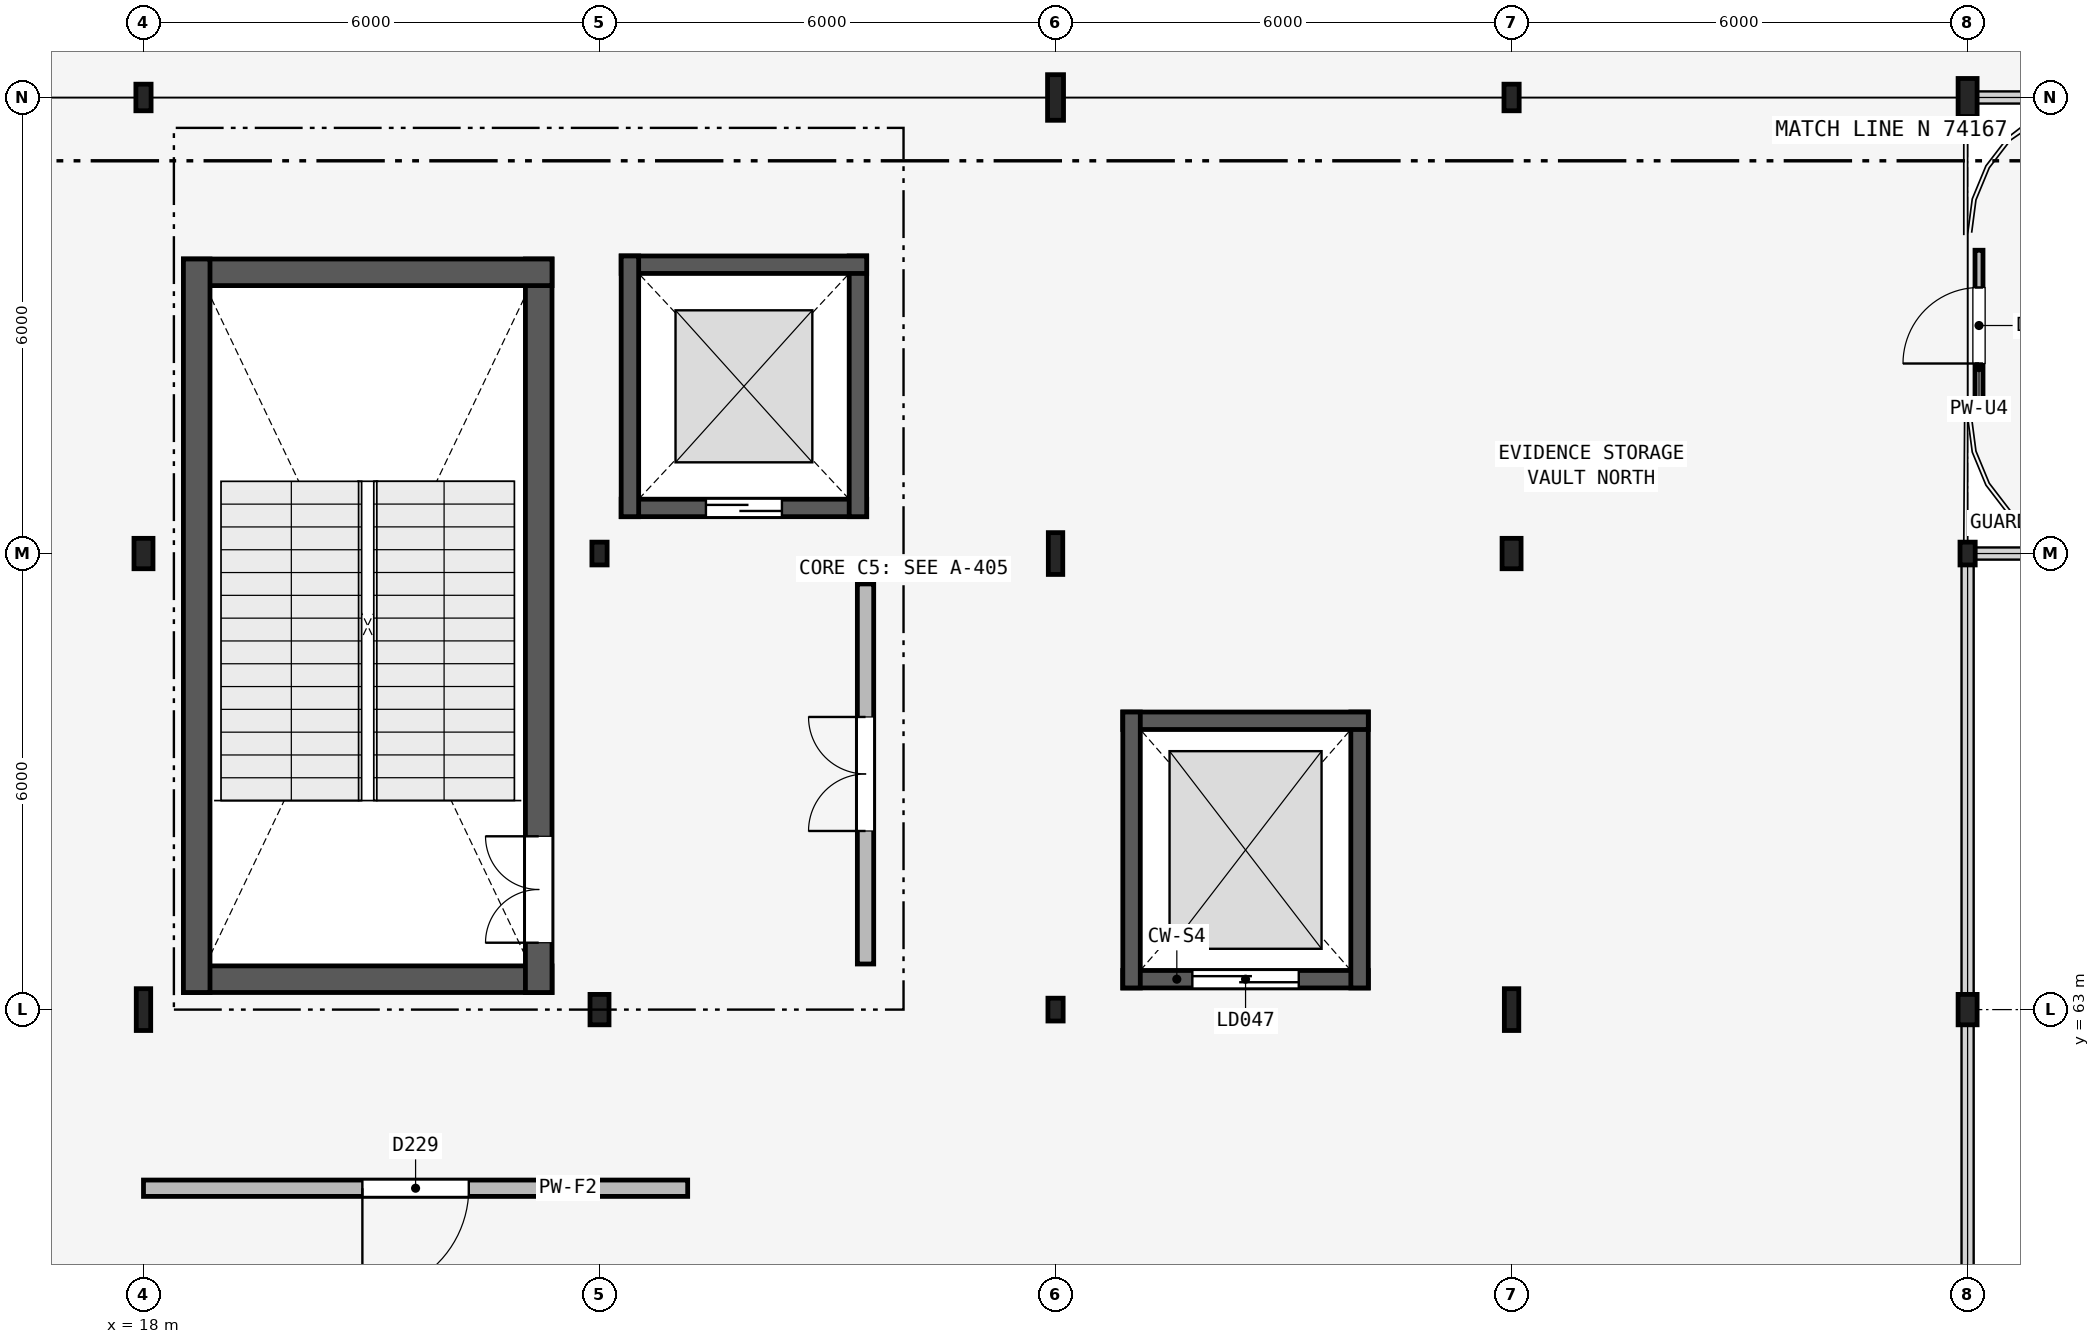
"""IFC4 building model, lengths in metres.
Left out: names, types, materials, properties, quantities, classifications, styles, units other than length and angle.
Written with IfcOpenShell. Run it as: python <this file> out.ifc"""

import sys

from ifc_helpers import new_model, si_unit, direction, frame, frame_2d, origin, origin_2d, place, context, subcontext, project, spatial, rectangle, hollow_rectangle, i_section, extrude, element, fill, save


model = new_model("IFC4")
c1 = context("Model", 3, precision=1e-05, world=origin(), true_north=direction((0.0, 1.0)))
c2 = subcontext(c1, "Body", "Model", "MODEL_VIEW")
j1 = project(units=[si_unit("LENGTHUNIT", "METRE"), si_unit("PLANEANGLEUNIT", "RADIAN")], contexts=[c1])
p1 = place(None, origin())
s1 = spatial("IfcSite", under=j1, at=p1, CompositionType="ELEMENT")
p2 = place(p1, origin())
s2 = spatial("IfcBuilding", under=s1, at=p2, CompositionType="ELEMENT")
p3 = place(p2, frame((0.0, 0.0, 9.3)))
s3 = spatial("IfcBuildingStorey", under=s2, at=p3, CompositionType="ELEMENT", Elevation=9.3)
p4 = place(p3, frame((18.0, 63.0, 0.0), z_axis=(0.0, 0.0, 1.0), x_axis=(1.0, 0.0, 0.0)))
e1 = element("IfcColumn", 1, at=p4, inside=s3, PredefinedType="COLUMN", context=c2, shape_type="SweptSolid", body=[
    extrude(i_section(OverallWidth=0.19, OverallDepth=0.55, WebThickness=0.011, FlangeThickness=0.019, FilletRadius=0.018, at=origin_2d()), origin(), (0.0, 0.0, 1.0), 4.2),
])
p5 = place(p3, frame((18.0, 69.0, 0.0), z_axis=(0.0, 0.0, 1.0), x_axis=(1.0, 0.0, 0.0)))
e2 = element("IfcColumn", 2, at=p5, inside=s3, PredefinedType="COLUMN", context=c2, shape_type="SweptSolid", body=[
    extrude(i_section(OverallWidth=0.25, OverallDepth=0.4, WebThickness=0.01, FlangeThickness=0.013, FilletRadius=0.014, at=origin_2d()), origin(), (0.0, 0.0, 1.0), 4.2),
])
p6 = place(p3, frame((18.0, 75.0, 0.0), z_axis=(0.0, 0.0, 1.0), x_axis=(1.0, 0.0, 0.0)))
e3 = element("IfcColumn", 3, at=p6, inside=s3, PredefinedType="COLUMN", context=c2, shape_type="SweptSolid", body=[
    extrude(hollow_rectangle(XDim=0.2, YDim=0.35, WallThickness=0.012, InnerFilletRadius=0.012, OuterFilletRadius=0.024, at=origin_2d()), origin(), (0.0, 0.0, 1.0), 4.2),
])
p7 = place(p3, frame((24.0, 63.0, 0.0), z_axis=(0.0, 0.0, 1.0), x_axis=(1.0, 0.0, 0.0)))
e4 = element("IfcColumn", 4, at=p7, inside=s3, PredefinedType="COLUMN", context=c2, shape_type="SweptSolid", body=[
    extrude(i_section(OverallWidth=0.25, OverallDepth=0.4, WebThickness=0.01, FlangeThickness=0.013, FilletRadius=0.014, at=origin_2d()), origin(), (0.0, 0.0, 1.0), 4.2),
])
for number, where, z_axis, x_axis in (
    (5, (24.0, 69.0, 0.0), (0.0, 0.0, 1.0), (1.0, 0.0, 0.0)),
    (6, (30.0, 63.0, 0.0), (0.0, 0.0, 1.0), (1.0, 0.0, 0.0)),
):
    element("IfcColumn", number, at=place(p3, frame(where, z_axis=z_axis, x_axis=x_axis)), inside=s3, PredefinedType="COLUMN", context=c2, shape_type="SweptSolid", body=[
        extrude(hollow_rectangle(XDim=0.2, YDim=0.3, WallThickness=0.012, InnerFilletRadius=0.012, OuterFilletRadius=0.024, at=origin_2d()), origin(), (0.0, 0.0, 1.0), 4.2),
    ])
p8 = place(p3, frame((30.0, 69.0, 0.0), z_axis=(0.0, 0.0, 1.0), x_axis=(1.0, 0.0, 0.0)))
e7 = element("IfcColumn", 7, at=p8, inside=s3, PredefinedType="COLUMN", context=c2, shape_type="SweptSolid", body=[
    extrude(i_section(OverallWidth=0.19, OverallDepth=0.55, WebThickness=0.011, FlangeThickness=0.019, FilletRadius=0.018, at=origin_2d()), origin(), (0.0, 0.0, 1.0), 4.2),
])
p9 = place(p3, frame((30.0, 75.0, 0.0), z_axis=(0.0, 0.0, 1.0), x_axis=(1.0, 0.0, 0.0)))
e8 = element("IfcColumn", 8, at=p9, inside=s3, PredefinedType="COLUMN", context=c2, shape_type="SweptSolid", body=[
    extrude(i_section(OverallWidth=0.21, OverallDepth=0.6, WebThickness=0.012, FlangeThickness=0.021, FilletRadius=0.02, at=origin_2d()), origin(), (0.0, 0.0, 1.0), 4.2),
])
p10 = place(p3, frame((36.0, 63.0, 0.0), z_axis=(0.0, 0.0, 1.0), x_axis=(1.0, 0.0, 0.0)))
e9 = element("IfcColumn", 9, at=p10, inside=s3, PredefinedType="COLUMN", context=c2, shape_type="SweptSolid", body=[
    extrude(i_section(OverallWidth=0.19, OverallDepth=0.55, WebThickness=0.011, FlangeThickness=0.019, FilletRadius=0.018, at=origin_2d()), origin(), (0.0, 0.0, 1.0), 4.2),
])
p11 = place(p3, frame((36.0, 69.0, 0.0), z_axis=(0.0, 0.0, 1.0), x_axis=(1.0, 0.0, 0.0)))
e10 = element("IfcColumn", 10, at=p11, inside=s3, PredefinedType="COLUMN", context=c2, shape_type="SweptSolid", body=[
    extrude(i_section(OverallWidth=0.25, OverallDepth=0.4, WebThickness=0.01, FlangeThickness=0.013, FilletRadius=0.014, at=origin_2d()), origin(), (0.0, 0.0, 1.0), 4.2),
])
p12 = place(p3, frame((36.0, 75.0, 0.0), z_axis=(0.0, 0.0, 1.0), x_axis=(1.0, 0.0, 0.0)))
e11 = element("IfcColumn", 11, at=p12, inside=s3, PredefinedType="COLUMN", context=c2, shape_type="SweptSolid", body=[
    extrude(hollow_rectangle(XDim=0.2, YDim=0.35, WallThickness=0.012, InnerFilletRadius=0.012, OuterFilletRadius=0.024, at=origin_2d()), origin(), (0.0, 0.0, 1.0), 4.2),
])
p13 = place(p3, frame((42.0, 63.0, 0.0), z_axis=(0.0, 0.0, 1.0), x_axis=(1.0, 0.0, 0.0)))
e12 = element("IfcColumn", 12, at=p13, inside=s3, PredefinedType="COLUMN", context=c2, shape_type="SweptSolid", body=[
    extrude(i_section(OverallWidth=0.25, OverallDepth=0.4, WebThickness=0.01, FlangeThickness=0.013, FilletRadius=0.014, at=origin_2d()), origin(), (0.0, 0.0, 1.0), 4.2),
])
p14 = place(p3, frame((42.0, 69.0, 0.0), z_axis=(0.0, 0.0, 1.0), x_axis=(1.0, 0.0, 0.0)))
e13 = element("IfcColumn", 13, at=p14, inside=s3, PredefinedType="COLUMN", context=c2, shape_type="SweptSolid", body=[
    extrude(hollow_rectangle(XDim=0.2, YDim=0.3, WallThickness=0.012, InnerFilletRadius=0.012, OuterFilletRadius=0.024, at=origin_2d()), origin(), (0.0, 0.0, 1.0), 4.2),
])
p15 = place(p3, frame((42.0, 75.0, 0.0), z_axis=(0.0, 0.0, 1.0), x_axis=(1.0, 0.0, 0.0)))
e14 = element("IfcColumn", 14, at=p15, inside=s3, PredefinedType="COLUMN", context=c2, shape_type="SweptSolid", body=[
    extrude(i_section(OverallWidth=0.25, OverallDepth=0.5, WebThickness=0.01, FlangeThickness=0.015, FilletRadius=0.015, at=origin_2d()), origin(), (0.0, 0.0, 1.0), 4.2),
])
p16 = place(p3, frame((18.525, 63.4, 0.0), z_axis=(0.0, 0.0, 1.0), x_axis=(1.0, 0.0, 0.0)))
e15 = element("IfcWall", 15, at=p16, inside=s3, PredefinedType="SHEAR", context=c2, shape_type="SweptSolid", body=[
    extrude(rectangle(XDim=4.85, YDim=0.35, at=frame_2d((2.425, 0.0))), origin(), (0.0, 0.0, 1.0), 4.06),
])
p17 = place(p3, frame((23.2, 63.225, 0.0), z_axis=(0.0, 0.0, 1.0), x_axis=(0.0, 1.0, 0.0)))
e16 = element("IfcWall", 16, at=p17, inside=s3, PredefinedType="SHEAR", context=c2, shape_type="SweptSolid", body=[
    extrude(rectangle(XDim=9.65, YDim=0.35, at=frame_2d((4.825, 0.0))), origin(), (0.0, 0.0, 1.0), 4.06),
])
p18 = place(p17, frame((0.655, 0.0, 0.0)))
e17 = element("IfcOpeningElement", 17, at=p18, cuts=e16, PredefinedType="OPENING", context=c2, shape_type="SweptSolid", body=[
    extrude(rectangle(XDim=1.4, YDim=2.2, at=frame_2d((0.7, 1.1))), frame((0.0, 0.185, 0.0), z_axis=(0.0, -1.0, 0.0), x_axis=(1.0, 0.0, 0.0)), (0.0, 0.0, 1.0), 0.37),
])
p19 = place(p3, frame((23.375, 72.7, 0.0), z_axis=(0.0, 0.0, 1.0), x_axis=(-1.0, 0.0, 0.0)))
e18 = element("IfcWall", 18, at=p19, inside=s3, PredefinedType="SHEAR", context=c2, shape_type="SweptSolid", body=[
    extrude(rectangle(XDim=4.85, YDim=0.35, at=frame_2d((2.425, 0.0))), origin(), (0.0, 0.0, 1.0), 4.06),
])
p20 = place(p3, frame((18.7, 72.875, 0.0), z_axis=(0.0, 0.0, 1.0), x_axis=(0.0, -1.0, 0.0)))
e19 = element("IfcWall", 19, at=p20, inside=s3, PredefinedType="SHEAR", context=c2, shape_type="SweptSolid", body=[
    extrude(rectangle(XDim=9.65, YDim=0.35, at=frame_2d((4.825, 0.0))), origin(), (0.0, 0.0, 1.0), 4.06),
])
p21 = place(p3, frame((27.5, 63.6, 0.0), z_axis=(0.0, 0.0, 1.0), x_axis=(0.0, 1.0, 0.0)))
e20 = element("IfcWall", 20, at=p21, inside=s3, PredefinedType="PARTITIONING", context=c2, shape_type="SweptSolid", body=[
    extrude(rectangle(XDim=5.0, YDim=0.215, at=frame_2d((2.5, 0.0))), origin(), (0.0, 0.0, 1.0), 3.89),
])
p22 = place(p21, frame((1.75, 0.0, 0.0)))
e21 = element("IfcOpeningElement", 21, at=p22, cuts=e20, PredefinedType="OPENING", context=c2, shape_type="SweptSolid", body=[
    extrude(rectangle(XDim=1.5, YDim=2.15, at=frame_2d((0.75, 1.075))), frame((0.0, 0.117, 0.0), z_axis=(0.0, -1.0, 0.0), x_axis=(1.0, 0.0, 0.0)), (0.0, 0.0, 1.0), 0.235),
])
p23 = place(p3, frame((24.285, 69.6, 0.0), z_axis=(0.0, 0.0, 1.0), x_axis=(1.0, 0.0, 0.0)))
e22 = element("IfcWall", 22, at=p23, inside=s3, PredefinedType="SHEAR", context=c2, shape_type="SweptSolid", body=[
    extrude(rectangle(XDim=3.23, YDim=0.23, at=frame_2d((1.615, 0.0))), origin(), (0.0, 0.0, 1.0), 4.2),
])
p24 = place(p23, frame((1.115, 0.0, 0.0)))
e23 = element("IfcOpeningElement", 23, at=p24, cuts=e22, PredefinedType="OPENING", context=c2, shape_type="SweptSolid", body=[
    extrude(rectangle(XDim=1.0, YDim=2.15, at=frame_2d((0.5, 1.075))), frame((0.0, 0.125, 0.0), z_axis=(0.0, -1.0, 0.0), x_axis=(1.0, 0.0, 0.0)), (0.0, 0.0, 1.0), 0.25),
])
p25 = place(p3, frame((27.4, 69.485, 0.0), z_axis=(0.0, 0.0, 1.0), x_axis=(0.0, 1.0, 0.0)))
e24 = element("IfcWall", 24, at=p25, inside=s3, PredefinedType="SHEAR", context=c2, shape_type="SweptSolid", body=[
    extrude(rectangle(XDim=3.43, YDim=0.23, at=frame_2d((1.715, 0.0))), origin(), (0.0, 0.0, 1.0), 4.2),
])
p26 = place(p3, frame((27.515, 72.8, 0.0), z_axis=(0.0, 0.0, 1.0), x_axis=(-1.0, 0.0, 0.0)))
e25 = element("IfcWall", 25, at=p26, inside=s3, PredefinedType="SHEAR", context=c2, shape_type="SweptSolid", body=[
    extrude(rectangle(XDim=3.23, YDim=0.23, at=frame_2d((1.615, 0.0))), origin(), (0.0, 0.0, 1.0), 4.2),
])
p27 = place(p3, frame((24.4, 72.915, 0.0), z_axis=(0.0, 0.0, 1.0), x_axis=(0.0, -1.0, 0.0)))
e26 = element("IfcWall", 26, at=p27, inside=s3, PredefinedType="SHEAR", context=c2, shape_type="SweptSolid", body=[
    extrude(rectangle(XDim=3.43, YDim=0.23, at=frame_2d((1.715, 0.0))), origin(), (0.0, 0.0, 1.0), 4.2),
])
p28 = place(p3, frame((30.885, 63.4, 0.0), z_axis=(0.0, 0.0, 1.0), x_axis=(1.0, 0.0, 0.0)))
e27 = element("IfcWall", 27, at=p28, inside=s3, PredefinedType="SHEAR", context=c2, shape_type="SweptSolid", body=[
    extrude(rectangle(XDim=3.23, YDim=0.23, at=frame_2d((1.615, 0.0))), origin(), (0.0, 0.0, 1.0), 4.2),
])
p29 = place(p28, frame((0.915, 0.0, 0.0)))
e28 = element("IfcOpeningElement", 28, at=p29, cuts=e27, PredefinedType="OPENING", context=c2, shape_type="SweptSolid", body=[
    extrude(rectangle(XDim=1.4, YDim=2.3, at=frame_2d((0.7, 1.15))), frame((0.0, 0.125, 0.0), z_axis=(0.0, -1.0, 0.0), x_axis=(1.0, 0.0, 0.0)), (0.0, 0.0, 1.0), 0.25),
])
p30 = place(p3, frame((34.0, 63.285, 0.0), z_axis=(0.0, 0.0, 1.0), x_axis=(0.0, 1.0, 0.0)))
e29 = element("IfcWall", 29, at=p30, inside=s3, PredefinedType="SHEAR", context=c2, shape_type="SweptSolid", body=[
    extrude(rectangle(XDim=3.63, YDim=0.23, at=frame_2d((1.815, 0.0))), origin(), (0.0, 0.0, 1.0), 4.2),
])
p31 = place(p3, frame((34.115, 66.8, 0.0), z_axis=(0.0, 0.0, 1.0), x_axis=(-1.0, 0.0, 0.0)))
e30 = element("IfcWall", 30, at=p31, inside=s3, PredefinedType="SHEAR", context=c2, shape_type="SweptSolid", body=[
    extrude(rectangle(XDim=3.23, YDim=0.23, at=frame_2d((1.615, 0.0))), origin(), (0.0, 0.0, 1.0), 4.2),
])
p32 = place(p3, frame((31.0, 66.915, 0.0), z_axis=(0.0, 0.0, 1.0), x_axis=(0.0, -1.0, 0.0)))
e31 = element("IfcWall", 31, at=p32, inside=s3, PredefinedType="SHEAR", context=c2, shape_type="SweptSolid", body=[
    extrude(rectangle(XDim=3.63, YDim=0.23, at=frame_2d((1.815, 0.0))), origin(), (0.0, 0.0, 1.0), 4.2),
])
p33 = place(p3, frame((42.15, 71.01, 0.0), z_axis=(0.0, 0.0, 1.0), x_axis=(0.0, 1.0, 0.0)))
e32 = element("IfcWall", 32, at=p33, inside=s3, PredefinedType="PARTITIONING", context=c2, shape_type="SweptSolid", body=[
    extrude(rectangle(XDim=1.98, YDim=0.105, at=frame_2d((0.99, 0.0))), origin(), (0.0, 0.0, 1.0), 3.566),
])
p34 = place(p33, frame((0.49, 0.0, 0.0)))
e33 = element("IfcOpeningElement", 33, at=p34, cuts=e32, PredefinedType="OPENING", context=c2, shape_type="SweptSolid", body=[
    extrude(rectangle(XDim=1.0, YDim=2.15, at=frame_2d((0.5, 1.075))), frame((0.0, 0.062, 0.0), z_axis=(0.0, -1.0, 0.0), x_axis=(1.0, 0.0, 0.0)), (0.0, 0.0, 1.0), 0.125),
])
p35 = place(p3, frame((25.16, 60.65, 0.0), z_axis=(0.0, 0.0, 1.0), x_axis=(-1.0, 0.0, 0.0)))
e34 = element("IfcWall", 34, at=p35, inside=s3, PredefinedType="PARTITIONING", context=c2, shape_type="SweptSolid", body=[
    extrude(rectangle(XDim=7.16, YDim=0.215, at=frame_2d((3.58, 0.0))), origin(), (0.0, 0.0, 1.0), 3.49),
])
p36 = place(p35, frame((2.88, 0.0, 0.0)))
e35 = element("IfcOpeningElement", 35, at=p36, cuts=e34, PredefinedType="OPENING", context=c2, shape_type="SweptSolid", body=[
    extrude(rectangle(XDim=1.4, YDim=2.25, at=frame_2d((0.7, 1.125))), frame((0.0, 0.117, 0.0), z_axis=(0.0, -1.0, 0.0), x_axis=(1.0, 0.0, 0.0)), (0.0, 0.0, 1.0), 0.235),
])
p37 = place(p18, origin())
e36 = element("IfcDoor", 36, at=p37, inside=s3, OperationType="DOUBLE_DOOR_SINGLE_SWING", PredefinedType="DOOR", context=c2, shape_type="SweptSolid", body=[
    extrude(rectangle(XDim=1.4, YDim=2.2, at=frame_2d((0.7, 1.1))), frame((0.0, 0.025, 0.0), z_axis=(0.0, -1.0, 0.0), x_axis=(1.0, 0.0, 0.0)), (0.0, 0.0, 1.0), 0.05),
])
fill(e17, e36)
p38 = place(p22, origin())
e37 = element("IfcDoor", 37, at=p38, inside=s3, OperationType="DOUBLE_DOOR_SINGLE_SWING", PredefinedType="DOOR", context=c2, shape_type="SweptSolid", body=[
    extrude(rectangle(XDim=1.5, YDim=2.15, at=frame_2d((0.75, 1.075))), frame((0.0, 0.025, 0.0), z_axis=(0.0, -1.0, 0.0), x_axis=(1.0, 0.0, 0.0)), (0.0, 0.0, 1.0), 0.05),
])
fill(e21, e37)
p39 = place(p24, origin())
e38 = element("IfcDoor", 38, at=p39, inside=s3, OperationType="SLIDING_TO_LEFT", PredefinedType="DOOR", context=c2, shape_type="SweptSolid", body=[
    extrude(rectangle(XDim=1.0, YDim=2.15, at=frame_2d((0.5, 1.075))), frame((0.0, 0.025, 0.0), z_axis=(0.0, -1.0, 0.0), x_axis=(1.0, 0.0, 0.0)), (0.0, 0.0, 1.0), 0.05),
])
fill(e23, e38)
p40 = place(p29, origin())
e39 = element("IfcDoor", 39, at=p40, inside=s3, OperationType="SLIDING_TO_LEFT", PredefinedType="DOOR", context=c2, shape_type="SweptSolid", body=[
    extrude(rectangle(XDim=1.4, YDim=2.3, at=frame_2d((0.7, 1.15))), frame((0.0, 0.025, 0.0), z_axis=(0.0, -1.0, 0.0), x_axis=(1.0, 0.0, 0.0)), (0.0, 0.0, 1.0), 0.05),
])
fill(e28, e39)
p41 = place(p34, origin())
e40 = element("IfcDoor", 40, at=p41, inside=s3, OperationType="SINGLE_SWING_LEFT", PredefinedType="DOOR", context=c2, shape_type="SweptSolid", body=[
    extrude(rectangle(XDim=1.0, YDim=2.15, at=frame_2d((0.5, 1.075))), frame((0.0, 0.025, 0.0), z_axis=(0.0, -1.0, 0.0), x_axis=(1.0, 0.0, 0.0)), (0.0, 0.0, 1.0), 0.05),
])
fill(e33, e40)
p42 = place(p36, origin())
e41 = element("IfcDoor", 41, at=p42, inside=s3, OperationType="SINGLE_SWING_RIGHT", PredefinedType="DOOR", context=c2, shape_type="SweptSolid", body=[
    extrude(rectangle(XDim=1.4, YDim=2.25, at=frame_2d((0.7, 1.125))), frame((0.0, 0.025, 0.0), z_axis=(0.0, -1.0, 0.0), x_axis=(1.0, 0.0, 0.0)), (0.0, 0.0, 1.0), 0.05),
])
fill(e35, e41)
save(model, sys.argv[1])
